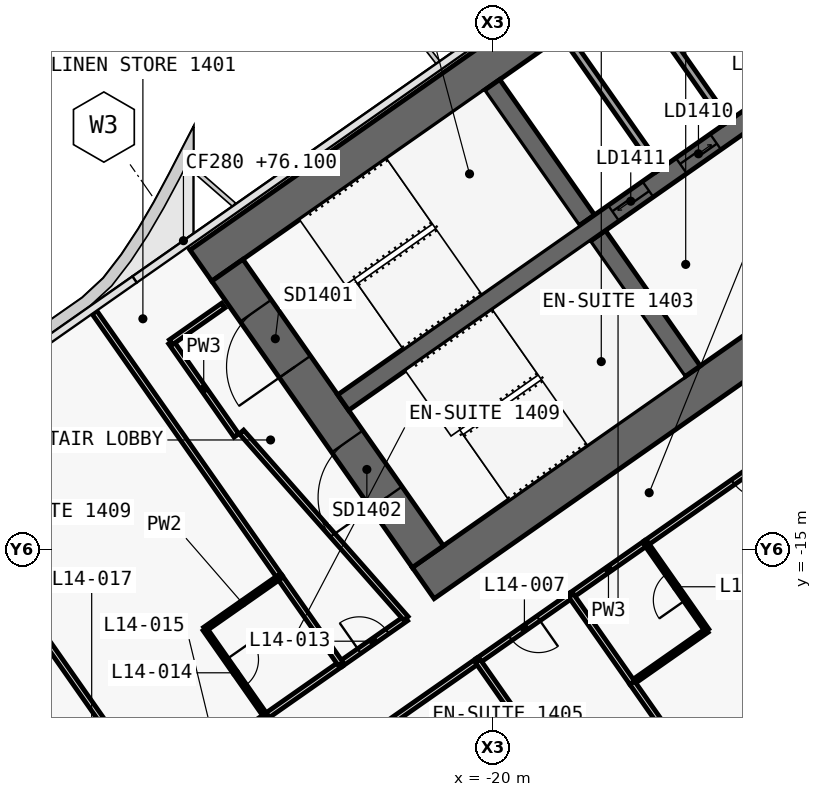
"""IFC4 building model, lengths in metres.
Left out: names, types, materials, properties, quantities, classifications, styles, units other than length and angle.
Written with IfcOpenShell. Run it as: python <this file> out.ifc"""

import sys

from ifc_helpers import new_model, si_unit, direction, frame, frame_2d, origin, place, context, subcontext, project, spatial, polyline, rectangle, outline, extrude, element, fill, save


model = new_model("IFC4")
c1 = context("Model", 3, precision=1e-05, world=origin(), true_north=direction((0.0, 1.0)))
c2 = subcontext(c1, "Body", "Model", "MODEL_VIEW")
j1 = project(units=[si_unit("LENGTHUNIT", "METRE"), si_unit("PLANEANGLEUNIT", "RADIAN")], contexts=[c1])
p1 = place(None, origin())
s1 = spatial("IfcSite", under=j1, at=p1, CompositionType="ELEMENT")
p2 = place(p1, origin())
s2 = spatial("IfcBuilding", under=s1, at=p2, CompositionType="ELEMENT")
p3 = place(p2, frame((0.0, 0.0, 76.1)))
s3 = spatial("IfcBuildingStorey", under=s2, at=p3, CompositionType="ELEMENT", Elevation=76.1)
p4 = place(p3, frame((0.037, 11.867, 0.0), z_axis=(0.0, 0.0, 1.0), x_axis=(-0.819155306259, -0.573571777746, 0.0)))
e1 = element("IfcWall", 1, at=p4, inside=s3, PredefinedType="SHEAR", context=c2, shape_type="SweptSolid", body=[
    extrude(outline(polyline([(33.837, 0.5), (0.7, 0.5), (0.0, -0.5), (33.837, -0.5), (33.837, 0.5)])), origin(), (0.0, 0.0, 1.0), 3.6),
])
p5 = place(p3, frame((0.037, -0.585, 0.0), z_axis=(0.0, 0.0, 1.0), x_axis=(-0.819157152511, -0.573569140985, 0.0)))
e2 = element("IfcWall", 2, at=p5, inside=s3, PredefinedType="SHEAR", context=c2, shape_type="SweptSolid", body=[
    extrude(outline(polyline([(26.695, 0.5), (0.7, 0.5), (0.0, -0.5), (26.695, -0.5), (26.695, 0.5)])), origin(), (0.0, 0.0, 1.0), 3.6),
])
p6 = place(p5, frame((2.995, 0.0, 0.0)))
e3 = element("IfcOpeningElement", 3, at=p6, cuts=e2, PredefinedType="OPENING", context=c2, shape_type="SweptSolid", body=[
    extrude(rectangle(XDim=2.4, YDim=2.1, at=frame_2d((1.2, 1.05))), frame((0.0, 0.51, 0.0), z_axis=(0.0, -1.0, 0.0), x_axis=(1.0, 0.0, 0.0)), (0.0, 0.0, 1.0), 1.02),
])
p7 = place(p5, frame((11.995, 0.0, 0.0)))
e4 = element("IfcOpeningElement", 4, at=p7, cuts=e2, PredefinedType="OPENING", context=c2, shape_type="SweptSolid", body=[
    extrude(rectangle(XDim=2.4, YDim=2.1, at=frame_2d((1.2, 1.05))), frame((0.0, 0.51, 0.0), z_axis=(0.0, -1.0, 0.0), x_axis=(1.0, 0.0, 0.0)), (0.0, 0.0, 1.0), 1.02),
])
p8 = place(p3, frame((-21.708, -15.2, 0.0), z_axis=(0.0, 0.0, 1.0), x_axis=(-0.573576324356, 0.819152122709, 0.0)))
e5 = element("IfcWall", 5, at=p8, inside=s3, PredefinedType="SHEAR", context=c2, shape_type="SweptSolid", body=[
    extrude(outline(polyline([(0.0, 0.5), (0.0, -0.5), (9.2, -0.5), (9.2, 0.5), (0.0, 0.5)])), origin(), (0.0, 0.0, 1.0), 3.6),
])
p9 = place(p8, frame((6.1, 0.0, 0.0)))
e6 = element("IfcOpeningElement", 6, at=p9, cuts=e5, PredefinedType="OPENING", context=c2, shape_type="SweptSolid", body=[
    extrude(rectangle(XDim=1.8, YDim=2.1, at=frame_2d((0.9, 1.05))), frame((0.0, 0.51, 0.0), z_axis=(0.0, -1.0, 0.0), x_axis=(1.0, 0.0, 0.0)), (0.0, 0.0, 1.0), 1.02),
])
p10 = place(p8, frame((1.9, 0.0, 0.0)))
e7 = element("IfcOpeningElement", 7, at=p10, cuts=e5, PredefinedType="OPENING", context=c2, shape_type="SweptSolid", body=[
    extrude(rectangle(XDim=1.8, YDim=2.1, at=frame_2d((0.9, 1.05))), frame((0.0, 0.51, 0.0), z_axis=(0.0, -1.0, 0.0), x_axis=(1.0, 0.0, 0.0)), (0.0, 0.0, 1.0), 1.02),
])
p11 = place(p3, frame((-14.745, -10.324, 0.0), z_axis=(0.0, 0.0, 1.0), x_axis=(-0.57356780395, 0.819158088694, 0.0)))
e8 = element("IfcWall", 8, at=p11, inside=s3, PredefinedType="SHEAR", context=c2, shape_type="SweptSolid", body=[
    extrude(outline(polyline([(4.35, 0.25), (0.0, 0.25), (0.0, -0.25), (4.35, -0.25), (4.35, 0.25)])), origin(), (0.0, 0.0, 1.0), 3.6),
])
p12 = place(p3, frame((-17.527, -6.352, 0.0), z_axis=(0.0, 0.0, 1.0), x_axis=(-0.573530143085, 0.819184457233, 0.0)))
e9 = element("IfcWall", 9, at=p12, inside=s3, PredefinedType="SHEAR", context=c2, shape_type="SweptSolid", body=[
    extrude(outline(polyline([(4.35, -0.25), (4.35, 0.25), (0.0, 0.25), (0.0, -0.25), (4.35, -0.25)])), origin(), (0.0, 0.0, 1.0), 3.6),
])
p13 = place(p3, frame((-2.638, 3.768, 0.0), z_axis=(0.0, 0.0, 1.0), x_axis=(-0.819148977158, -0.573580816643, 0.0)))
e10 = element("IfcWall", 10, at=p13, inside=s3, PredefinedType="SHEAR", context=c2, shape_type="SweptSolid", body=[
    extrude(outline(polyline([(26.0, 0.25), (0.0, 0.25), (0.0, -0.25), (26.0, -0.25), (26.0, 0.25)])), origin(), (0.0, 0.0, 1.0), 3.6),
])
p14 = place(p13, frame((1.169, 0.0, 0.0)))
e11 = element("IfcOpeningElement", 11, at=p14, cuts=e10, PredefinedType="OPENING", context=c2, shape_type="SweptSolid", body=[
    extrude(rectangle(XDim=1.1, YDim=2.1, at=frame_2d((0.55, 1.05))), frame((0.0, 0.26, 0.0), z_axis=(0.0, -1.0, 0.0), x_axis=(1.0, 0.0, 0.0)), (0.0, 0.0, 1.0), 0.52),
])
p15 = place(p13, frame((3.206, 0.0, 0.0)))
e12 = element("IfcOpeningElement", 12, at=p15, cuts=e10, PredefinedType="OPENING", context=c2, shape_type="SweptSolid", body=[
    extrude(rectangle(XDim=1.1, YDim=2.1, at=frame_2d((0.55, 1.05))), frame((0.0, 0.26, 0.0), z_axis=(0.0, -1.0, 0.0), x_axis=(1.0, 0.0, 0.0)), (0.0, 0.0, 1.0), 0.52),
])
p16 = place(p13, frame((5.244, 0.0, 0.0)))
e13 = element("IfcOpeningElement", 13, at=p16, cuts=e10, PredefinedType="OPENING", context=c2, shape_type="SweptSolid", body=[
    extrude(rectangle(XDim=1.1, YDim=2.1, at=frame_2d((0.55, 1.05))), frame((0.0, 0.26, 0.0), z_axis=(0.0, -1.0, 0.0), x_axis=(1.0, 0.0, 0.0)), (0.0, 0.0, 1.0), 0.52),
])
p17 = place(p13, frame((7.281, 0.0, 0.0)))
e14 = element("IfcOpeningElement", 14, at=p17, cuts=e10, PredefinedType="OPENING", context=c2, shape_type="SweptSolid", body=[
    extrude(rectangle(XDim=1.1, YDim=2.1, at=frame_2d((0.55, 1.05))), frame((0.0, 0.26, 0.0), z_axis=(0.0, -1.0, 0.0), x_axis=(1.0, 0.0, 0.0)), (0.0, 0.0, 1.0), 0.52),
])
p18 = place(p13, frame((9.688, 0.0, 0.0)))
e15 = element("IfcOpeningElement", 15, at=p18, cuts=e10, PredefinedType="OPENING", context=c2, shape_type="SweptSolid", body=[
    extrude(rectangle(XDim=1.1, YDim=2.1, at=frame_2d((0.55, 1.05))), frame((0.0, 0.26, 0.0), z_axis=(0.0, -1.0, 0.0), x_axis=(1.0, 0.0, 0.0)), (0.0, 0.0, 1.0), 0.52),
])
p19 = place(p13, frame((11.863, 0.0, 0.0)))
e16 = element("IfcOpeningElement", 16, at=p19, cuts=e10, PredefinedType="OPENING", context=c2, shape_type="SweptSolid", body=[
    extrude(rectangle(XDim=1.1, YDim=2.1, at=frame_2d((0.55, 1.05))), frame((0.0, 0.26, 0.0), z_axis=(0.0, -1.0, 0.0), x_axis=(1.0, 0.0, 0.0)), (0.0, 0.0, 1.0), 0.52),
])
p20 = place(p13, frame((14.038, 0.0, 0.0)))
e17 = element("IfcOpeningElement", 17, at=p20, cuts=e10, PredefinedType="OPENING", context=c2, shape_type="SweptSolid", body=[
    extrude(rectangle(XDim=1.1, YDim=2.1, at=frame_2d((0.55, 1.05))), frame((0.0, 0.26, 0.0), z_axis=(0.0, -1.0, 0.0), x_axis=(1.0, 0.0, 0.0)), (0.0, 0.0, 1.0), 0.52),
])
p21 = place(p13, frame((16.212, 0.0, 0.0)))
e18 = element("IfcOpeningElement", 18, at=p21, cuts=e10, PredefinedType="OPENING", context=c2, shape_type="SweptSolid", body=[
    extrude(rectangle(XDim=1.1, YDim=2.1, at=frame_2d((0.55, 1.05))), frame((0.0, 0.26, 0.0), z_axis=(0.0, -1.0, 0.0), x_axis=(1.0, 0.0, 0.0)), (0.0, 0.0, 1.0), 0.52),
])
p22 = place(p3, frame((-12.059, -2.523, 0.0), z_axis=(0.0, 0.0, 1.0), x_axis=(-0.573594173421, 0.819139624372, 0.0)))
e19 = element("IfcWall", 19, at=p22, inside=s3, PredefinedType="SOLIDWALL", context=c2, shape_type="SweptSolid", body=[
    extrude(rectangle(XDim=4.35, YDim=0.2, at=frame_2d((2.175, 0.0))), origin(), (0.0, 0.0, 1.0), 3.6),
])
p23 = place(p3, frame((-13.84, -3.771, 0.0), z_axis=(0.0, 0.0, 1.0), x_axis=(-0.57356780395, 0.819158088694, 0.0)))
e20 = element("IfcWall", 20, at=p23, inside=s3, PredefinedType="SOLIDWALL", context=c2, shape_type="SweptSolid", body=[
    extrude(rectangle(XDim=4.35, YDim=0.2, at=frame_2d((2.175, 0.0))), origin(), (0.0, 0.0, 1.0), 3.6),
])
p24 = place(p3, frame((-15.622, -5.018, 0.0), z_axis=(0.0, 0.0, 1.0), x_axis=(-0.573594173421, 0.819139624372, 0.0)))
e21 = element("IfcWall", 21, at=p24, inside=s3, PredefinedType="SOLIDWALL", context=c2, shape_type="SweptSolid", body=[
    extrude(rectangle(XDim=4.35, YDim=0.2, at=frame_2d((2.175, 0.0))), origin(), (0.0, 0.0, 1.0), 3.6),
])
p25 = place(p3, frame((-24.003, -18.028, 0.0), z_axis=(0.0, 0.0, 1.0), x_axis=(0.819160859995, 0.573563846013, 0.0)))
e22 = element("IfcWall", 22, at=p25, inside=s3, PredefinedType="PARTITIONING", context=c2, shape_type="SweptSolid", body=[
    extrude(rectangle(XDim=2.098, YDim=0.15, at=frame_2d((1.049, 0.0))), origin(), (0.0, 0.0, 1.0), 3.32),
])
p26 = place(p25, frame((0.599, 0.0, 0.0)))
e23 = element("IfcOpeningElement", 23, at=p26, cuts=e22, PredefinedType="OPENING", context=c2, shape_type="SweptSolid", body=[
    extrude(rectangle(XDim=0.9, YDim=2.1, at=frame_2d((0.45, 1.05))), frame((0.0, 0.085, 0.0), z_axis=(0.0, -1.0, 0.0), x_axis=(1.0, 0.0, 0.0)), (0.0, 0.0, 1.0), 0.17),
])
p27 = place(p3, frame((-28.917, -21.469, 0.0), z_axis=(0.0, 0.0, 1.0), x_axis=(0.81917779803, 0.57353965444, 0.0)))
e24 = element("IfcWall", 24, at=p27, inside=s3, PredefinedType="PARTITIONING", context=c2, shape_type="SweptSolid", body=[
    extrude(rectangle(XDim=3.603, YDim=0.15, at=frame_2d((1.801, 0.0))), origin(), (0.0, 0.0, 1.0), 2.6),
])
p28 = place(p27, frame((1.502, 0.0, 0.0)))
e25 = element("IfcOpeningElement", 25, at=p28, cuts=e24, PredefinedType="OPENING", context=c2, shape_type="SweptSolid", body=[
    extrude(rectangle(XDim=1.0, YDim=2.1, at=frame_2d((0.5, 1.05))), frame((0.0, 0.085, 0.0), z_axis=(0.0, -1.0, 0.0), x_axis=(1.0, 0.0, 0.0)), (0.0, 0.0, 1.0), 0.17),
])
p29 = place(p3, frame((-25.969, -19.404, 0.0), z_axis=(0.0, 0.0, 1.0), x_axis=(0.819146032251, 0.573585022335, 0.0)))
e26 = element("IfcWall", 26, at=p29, inside=s3, PredefinedType="PARTITIONING", context=c2, shape_type="SweptSolid", body=[
    extrude(rectangle(XDim=2.404, YDim=0.15, at=frame_2d((1.202, 0.0))), origin(), (0.0, 0.0, 1.0), 3.32),
])
p30 = place(p3, frame((-10.565, -11.06, 0.0), z_axis=(0.0, 0.0, 1.0), x_axis=(-0.819153746897, -0.573574004767, 0.0)))
e27 = element("IfcWall", 27, at=p30, inside=s3, PredefinedType="PARTITIONING", context=c2, shape_type="SweptSolid", body=[
    extrude(rectangle(XDim=6.603, YDim=0.15, at=frame_2d((3.302, 0.0))), origin(), (0.0, 0.0, 1.0), 2.6),
])
p31 = place(p30, frame((2.802, 0.0, 0.0)))
e28 = element("IfcOpeningElement", 28, at=p31, cuts=e27, PredefinedType="OPENING", context=c2, shape_type="SweptSolid", body=[
    extrude(rectangle(XDim=1.0, YDim=2.1, at=frame_2d((0.5, 1.05))), frame((0.0, 0.085, 0.0), z_axis=(0.0, -1.0, 0.0), x_axis=(1.0, 0.0, 0.0)), (0.0, 0.0, 1.0), 0.17),
])
p32 = place(p3, frame((-15.971, -14.846, 0.0), z_axis=(0.0, 0.0, 1.0), x_axis=(-0.81922714955, -0.573469159974, 0.0)))
e29 = element("IfcWall", 29, at=p32, inside=s3, PredefinedType="PARTITIONING", context=c2, shape_type="SweptSolid", body=[
    extrude(rectangle(XDim=2.404, YDim=0.15, at=frame_2d((1.202, 0.0))), origin(), (0.0, 0.0, 1.0), 3.32),
])
p33 = place(p3, frame((-17.937, -16.222, 0.0), z_axis=(0.0, 0.0, 1.0), x_axis=(-0.819128818764, -0.573609604409, 0.0)))
e30 = element("IfcWall", 30, at=p33, inside=s3, PredefinedType="PARTITIONING", context=c2, shape_type="SweptSolid", body=[
    extrude(rectangle(XDim=3.004, YDim=0.15, at=frame_2d((1.502, 0.0))), origin(), (0.0, 0.0, 1.0), 2.6),
])
p34 = place(p33, frame((1.052, 0.0, 0.0)))
e31 = element("IfcOpeningElement", 31, at=p34, cuts=e30, PredefinedType="OPENING", context=c2, shape_type="SweptSolid", body=[
    extrude(rectangle(XDim=0.9, YDim=2.1, at=frame_2d((0.45, 1.05))), frame((0.0, 0.085, 0.0), z_axis=(0.0, -1.0, 0.0), x_axis=(1.0, 0.0, 0.0)), (0.0, 0.0, 1.0), 0.17),
])
p35 = place(p3, frame((-20.395, -17.943, 0.0), z_axis=(0.0, 0.0, 1.0), x_axis=(-0.819153746897, -0.573574004767, 0.0)))
e32 = element("IfcWall", 32, at=p35, inside=s3, PredefinedType="PARTITIONING", context=c2, shape_type="SweptSolid", body=[
    extrude(rectangle(XDim=6.603, YDim=0.15, at=frame_2d((3.302, 0.0))), origin(), (0.0, 0.0, 1.0), 2.6),
])
p36 = place(p35, frame((2.802, 0.0, 0.0)))
e33 = element("IfcOpeningElement", 33, at=p36, cuts=e32, PredefinedType="OPENING", context=c2, shape_type="SweptSolid", body=[
    extrude(rectangle(XDim=1.0, YDim=2.1, at=frame_2d((0.5, 1.05))), frame((0.0, 0.085, 0.0), z_axis=(0.0, -1.0, 0.0), x_axis=(1.0, 0.0, 0.0)), (0.0, 0.0, 1.0), 0.17),
])
p37 = place(p3, frame((-26.746, -12.014, 0.0), z_axis=(0.0, 0.0, 1.0), x_axis=(-0.573560650686, 0.819163097304, 0.0)))
e34 = element("IfcWall", 34, at=p37, inside=s3, PredefinedType="PARTITIONING", context=c2, shape_type="SweptSolid", body=[
    extrude(rectangle(XDim=3.0, YDim=0.15, at=frame_2d((1.5, 0.0))), origin(), (0.0, 0.0, 1.0), 3.32),
])
p38 = place(p3, frame((-28.467, -9.556, 0.0), z_axis=(0.0, 0.0, 1.0), x_axis=(0.819109000826, 0.573637903879, 0.0)))
e35 = element("IfcWall", 35, at=p38, inside=s3, PredefinedType="PARTITIONING", context=c2, shape_type="SweptSolid", body=[
    extrude(rectangle(XDim=1.68, YDim=0.15, at=frame_2d((0.84, 0.0))), origin(), (0.0, 0.0, 1.0), 3.32),
])
p39 = place(p3, frame((-22.284, -16.827, 0.0), z_axis=(0.0, 0.0, 1.0), x_axis=(-0.661545117561, 0.749905365651, 0.0)))
e36 = element("IfcWall", 36, at=p39, inside=s3, PredefinedType="PARTITIONING", context=c2, shape_type="SweptSolid", body=[
    extrude(rectangle(XDim=6.543, YDim=0.15, at=frame_2d((3.271, 0.0))), origin(), (0.0, 0.0, 1.0), 2.6),
])
p40 = place(p3, frame((-25.606, -15.734, 0.0), z_axis=(0.0, 0.0, 1.0), x_axis=(-0.573576058406, 0.819152308929, 0.0)))
e37 = element("IfcWall", 37, at=p40, inside=s3, PredefinedType="PARTITIONING", context=c2, shape_type="SweptSolid", body=[
    extrude(rectangle(XDim=8.501, YDim=0.15, at=frame_2d((4.25, 0.0))), origin(), (0.0, 0.0, 1.0), 2.6),
])
p41 = place(p3, frame((-24.001, -18.026, 0.0), z_axis=(0.0, 0.0, 1.0), x_axis=(-0.573596837309, 0.819137759006, 0.0)))
e38 = element("IfcWall", 38, at=p41, inside=s3, PredefinedType="PARTITIONING", context=c2, shape_type="SweptSolid", body=[
    extrude(rectangle(XDim=2.802, YDim=0.15, at=frame_2d((1.401, 0.0))), origin(), (0.0, 0.0, 1.0), 2.6),
])
p42 = place(p3, frame((-25.608, -15.732, 0.0), z_axis=(0.0, 0.0, 1.0), x_axis=(-0.819107643868, -0.573639841501, 0.0)))
e39 = element("IfcWall", 39, at=p42, inside=s3, PredefinedType="PARTITIONING", context=c2, shape_type="SweptSolid", body=[
    extrude(rectangle(XDim=2.4, YDim=0.12, at=frame_2d((1.2, 0.0))), origin(), (0.0, 0.0, 1.0), 3.32),
])
p43 = place(p3, frame((-27.574, -17.11, 0.0), z_axis=(0.0, 0.0, 1.0), x_axis=(0.573591086599, -0.819141785879, 0.0)))
e40 = element("IfcWall", 40, at=p43, inside=s3, PredefinedType="PARTITIONING", context=c2, shape_type="SweptSolid", body=[
    extrude(rectangle(XDim=2.8, YDim=0.12, at=frame_2d((1.4, 0.0))), origin(), (0.0, 0.0, 1.0), 2.6),
])
p44 = place(p43, frame((0.975, 0.0, 0.0)))
e41 = element("IfcOpeningElement", 41, at=p44, cuts=e40, PredefinedType="OPENING", context=c2, shape_type="SweptSolid", body=[
    extrude(rectangle(XDim=0.85, YDim=2.05, at=frame_2d((0.425, 1.025))), frame((0.0, 0.07, 0.0), z_axis=(0.0, -1.0, 0.0), x_axis=(1.0, 0.0, 0.0)), (0.0, 0.0, 1.0), 0.14),
])
p45 = place(p3, frame((-29.845, -20.141, 0.0), z_axis=(0.0, 0.0, 1.0), x_axis=(-0.573558725113, 0.819164445546, 0.0)))
e42 = element("IfcWall", 42, at=p45, inside=s3, PredefinedType="PARTITIONING", context=c2, shape_type="SweptSolid", body=[
    extrude(rectangle(XDim=9.01, YDim=0.15, at=frame_2d((4.505, 0.0))), origin(), (0.0, 0.0, 1.0), 2.6),
])
p46 = place(p3, frame((-16.332, -18.518, 0.0), z_axis=(0.0, 0.0, 1.0), x_axis=(0.819155442668, 0.573571582932, 0.0)))
e43 = element("IfcWall", 43, at=p46, inside=s3, PredefinedType="PARTITIONING", context=c2, shape_type="SweptSolid", body=[
    extrude(rectangle(XDim=2.4, YDim=0.12, at=frame_2d((1.2, 0.0))), origin(), (0.0, 0.0, 1.0), 3.32),
])
p47 = place(p3, frame((-14.366, -17.14, 0.0), z_axis=(0.0, 0.0, 1.0), x_axis=(-0.573550118428, 0.819170471667, 0.0)))
e44 = element("IfcWall", 44, at=p47, inside=s3, PredefinedType="PARTITIONING", context=c2, shape_type="SweptSolid", body=[
    extrude(rectangle(XDim=2.8, YDim=0.12, at=frame_2d((1.4, 0.0))), origin(), (0.0, 0.0, 1.0), 3.32),
])
p48 = place(p47, frame((0.975, 0.0, 0.0)))
e45 = element("IfcOpeningElement", 45, at=p48, cuts=e44, PredefinedType="OPENING", context=c2, shape_type="SweptSolid", body=[
    extrude(rectangle(XDim=0.85, YDim=2.05, at=frame_2d((0.425, 1.025))), frame((0.0, 0.07, 0.0), z_axis=(0.0, -1.0, 0.0), x_axis=(1.0, 0.0, 0.0)), (0.0, 0.0, 1.0), 0.14),
])
p49 = place(p3, frame((-13.752, -22.203, 0.0), z_axis=(0.0, 0.0, 1.0), x_axis=(-0.573564311442, 0.819160534108, 0.0)))
e46 = element("IfcWall", 46, at=p49, inside=s3, PredefinedType="PARTITIONING", context=c2, shape_type="SweptSolid", body=[
    extrude(rectangle(XDim=4.499, YDim=0.15, at=frame_2d((2.25, 0.0))), origin(), (0.0, 0.0, 1.0), 2.5),
])
p50 = place(p3, frame((-16.333, -18.517, 0.0), z_axis=(0.0, 0.0, 1.0), x_axis=(-0.573591086599, 0.819141785879, 0.0)))
e47 = element("IfcWall", 47, at=p50, inside=s3, PredefinedType="PARTITIONING", context=c2, shape_type="SweptSolid", body=[
    extrude(rectangle(XDim=2.8, YDim=0.15, at=frame_2d((1.4, 0.0))), origin(), (0.0, 0.0, 1.0), 3.32),
])
p51 = place(p3, frame((-16.594, -23.375, 0.0), z_axis=(0.0, 0.0, 1.0), x_axis=(-0.57359826181, 0.819136761505, 0.0)))
e48 = element("IfcWall", 48, at=p51, inside=s3, PredefinedType="PARTITIONING", context=c2, shape_type="SweptSolid", body=[
    extrude(rectangle(XDim=6.63, YDim=0.15, at=frame_2d((3.315, 0.0))), origin(), (0.0, 0.0, 1.0), 2.6),
])
p52 = place(p20, origin())
e49 = element("IfcDoor", 49, at=p52, inside=s3, OperationType="SLIDING_TO_LEFT", PredefinedType="DOOR", context=c2, shape_type="SweptSolid", body=[
    extrude(rectangle(XDim=1.1, YDim=2.1, at=frame_2d((0.55, 1.05))), frame((0.0, 0.025, 0.0), z_axis=(0.0, -1.0, 0.0), x_axis=(1.0, 0.0, 0.0)), (0.0, 0.0, 1.0), 0.05),
])
fill(e17, e49)
p53 = place(p21, origin())
e50 = element("IfcDoor", 50, at=p53, inside=s3, OperationType="SLIDING_TO_RIGHT", PredefinedType="DOOR", context=c2, shape_type="SweptSolid", body=[
    extrude(rectangle(XDim=1.1, YDim=2.1, at=frame_2d((0.55, 1.05))), frame((0.0, 0.025, 0.0), z_axis=(0.0, -1.0, 0.0), x_axis=(1.0, 0.0, 0.0)), (0.0, 0.0, 1.0), 0.05),
])
fill(e18, e50)
p54 = place(p9, origin())
e51 = element("IfcDoor", 51, at=p54, inside=s3, OperationType="DOUBLE_DOOR_SINGLE_SWING", PredefinedType="DOOR", context=c2, shape_type="SweptSolid", body=[
    extrude(rectangle(XDim=1.8, YDim=2.1, at=frame_2d((0.9, 1.05))), frame((0.0, 0.025, 0.0), z_axis=(0.0, -1.0, 0.0), x_axis=(1.0, 0.0, 0.0)), (0.0, 0.0, 1.0), 0.05),
])
fill(e6, e51)
p55 = place(p10, origin())
e52 = element("IfcDoor", 52, at=p55, inside=s3, OperationType="DOUBLE_DOOR_SINGLE_SWING", PredefinedType="DOOR", context=c2, shape_type="SweptSolid", body=[
    extrude(rectangle(XDim=1.8, YDim=2.1, at=frame_2d((0.9, 1.05))), frame((0.0, 0.025, 0.0), z_axis=(0.0, -1.0, 0.0), x_axis=(1.0, 0.0, 0.0)), (0.0, 0.0, 1.0), 0.05),
])
fill(e7, e52)
p56 = place(p48, origin())
e53 = element("IfcDoor", 53, at=p56, inside=s3, OperationType="SINGLE_SWING_LEFT", PredefinedType="DOOR", context=c2, shape_type="SweptSolid", body=[
    extrude(rectangle(XDim=0.85, YDim=2.05, at=frame_2d((0.425, 1.025))), frame((0.0, 0.025, 0.0), z_axis=(0.0, -1.0, 0.0), x_axis=(1.0, 0.0, 0.0)), (0.0, 0.0, 1.0), 0.05),
])
fill(e45, e53)
p57 = place(p31, origin())
e54 = element("IfcDoor", 54, at=p57, inside=s3, OperationType="SINGLE_SWING_LEFT", PredefinedType="DOOR", context=c2, shape_type="SweptSolid", body=[
    extrude(rectangle(XDim=1.0, YDim=2.1, at=frame_2d((0.5, 1.05))), frame((0.0, 0.025, 0.0), z_axis=(0.0, -1.0, 0.0), x_axis=(1.0, 0.0, 0.0)), (0.0, 0.0, 1.0), 0.05),
])
fill(e28, e54)
p58 = place(p34, origin())
e55 = element("IfcDoor", 55, at=p58, inside=s3, OperationType="SINGLE_SWING_RIGHT", PredefinedType="DOOR", context=c2, shape_type="SweptSolid", body=[
    extrude(rectangle(XDim=0.9, YDim=2.1, at=frame_2d((0.45, 1.05))), frame((0.0, 0.025, 0.0), z_axis=(0.0, -1.0, 0.0), x_axis=(1.0, 0.0, 0.0)), (0.0, 0.0, 1.0), 0.05),
])
fill(e31, e55)
p59 = place(p26, origin())
e56 = element("IfcDoor", 56, at=p59, inside=s3, OperationType="SINGLE_SWING_LEFT", PredefinedType="DOOR", context=c2, shape_type="SweptSolid", body=[
    extrude(rectangle(XDim=0.9, YDim=2.1, at=frame_2d((0.45, 1.05))), frame((0.0, 0.025, 0.0), z_axis=(0.0, -1.0, 0.0), x_axis=(1.0, 0.0, 0.0)), (0.0, 0.0, 1.0), 0.05),
])
fill(e23, e56)
p60 = place(p44, origin())
e57 = element("IfcDoor", 57, at=p60, inside=s3, OperationType="SINGLE_SWING_RIGHT", PredefinedType="DOOR", context=c2, shape_type="SweptSolid", body=[
    extrude(rectangle(XDim=0.85, YDim=2.05, at=frame_2d((0.425, 1.025))), frame((0.0, 0.025, 0.0), z_axis=(0.0, -1.0, 0.0), x_axis=(1.0, 0.0, 0.0)), (0.0, 0.0, 1.0), 0.05),
])
fill(e41, e57)
save(model, sys.argv[1])
